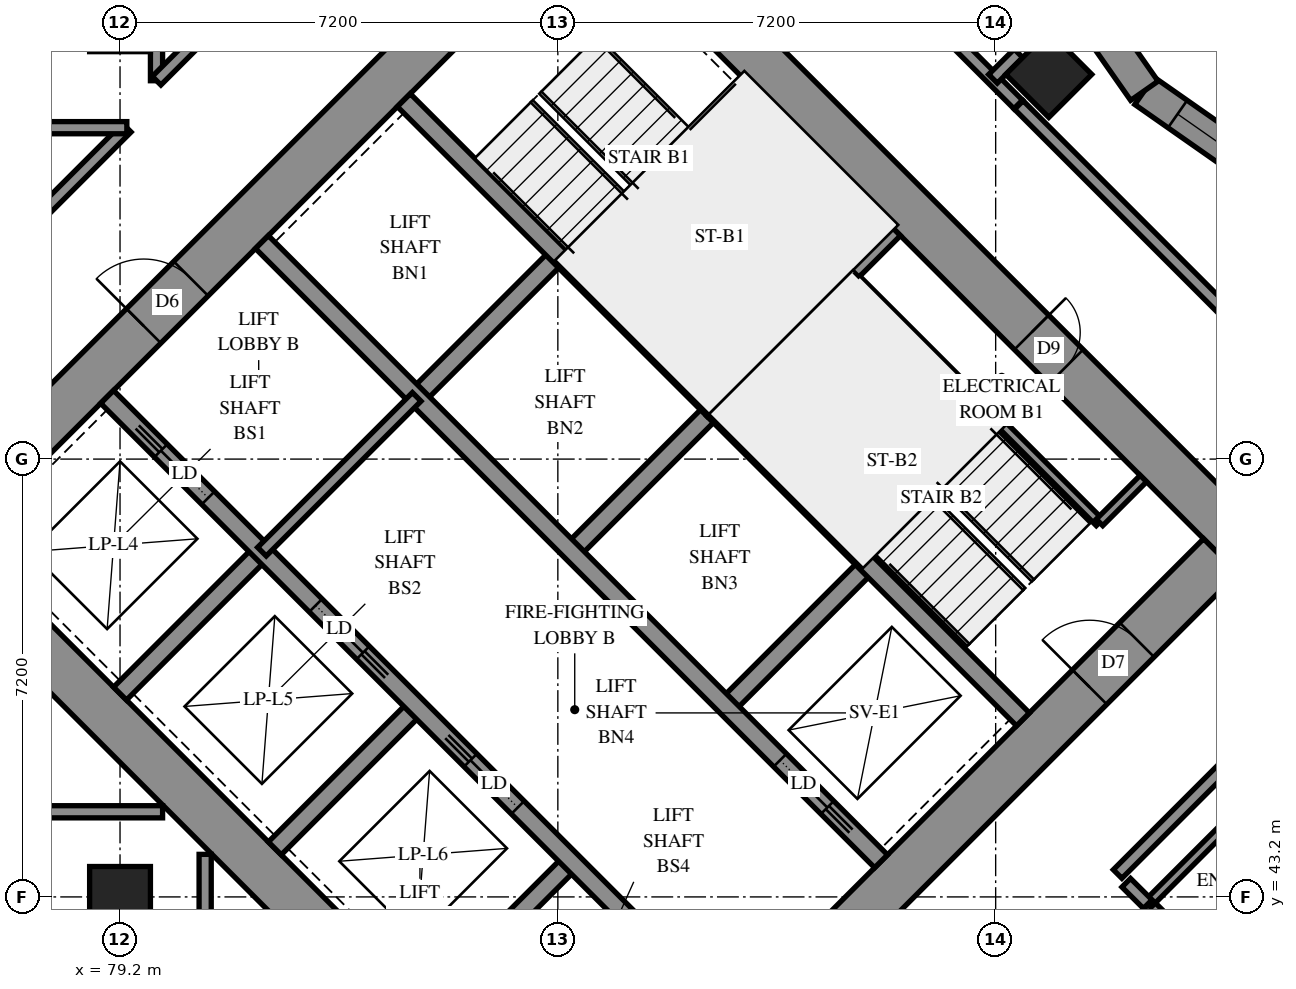
"""IFC4 building model, lengths in metres.
Left out: names, types, materials, properties, quantities, classifications, styles, units other than length and angle.
Written with IfcOpenShell. Run it as: python <this file> out.ifc"""

import sys

from ifc_helpers import new_model, si_unit, direction, frame, frame_2d, origin, origin_2d, place, context, subcontext, project, spatial, polyline, rectangle, outline, extrude, element, fill, save


model = new_model("IFC4")
c1 = context("Model", 3, precision=1e-05, world=origin(), true_north=direction((0.0, 1.0)))
c2 = subcontext(c1, "Body", "Model", "MODEL_VIEW")
j1 = project(units=[si_unit("LENGTHUNIT", "METRE"), si_unit("PLANEANGLEUNIT", "RADIAN")], contexts=[c1])
p1 = place(None, origin())
s1 = spatial("IfcSite", under=j1, at=p1, CompositionType="ELEMENT")
p2 = place(p1, origin())
s2 = spatial("IfcBuilding", under=s1, at=p2, CompositionType="ELEMENT")
p3 = place(p2, frame((0.0, 0.0, 115.2)))
s3 = spatial("IfcBuildingStorey", under=s2, at=p3, CompositionType="ELEMENT", Elevation=115.2)
for number, where, z_axis, x_axis in (
    (1, (79.2, 43.2, 0.0), (0.0, 0.0, 1.0), (1.0, 0.0, 0.0)),
    (2, (94.474, 56.727, 0.0), (0.0, 0.0, 1.0), (0.707, -0.707, 0.0)),
):
    element("IfcColumn", number, at=place(p3, frame(where, z_axis=z_axis, x_axis=x_axis)), inside=s3, PredefinedType="COLUMN", context=c2, shape_type="SweptSolid", body=[
        extrude(rectangle(XDim=1.0, YDim=1.0, at=origin_2d()), origin(), (0.0, 0.0, 1.0), 3.1),
    ])
p4 = place(p3, frame((75.806, 49.373, -0.3), z_axis=(0.0, 0.0, 1.0), x_axis=(0.7071067812, -0.7071067812, 0.0)))
e3 = element("IfcWall", 3, at=p4, inside=s3, PredefinedType="SHEAR", context=c2, shape_type="SweptSolid", body=[
    extrude(rectangle(XDim=16.0, YDim=0.8, at=frame_2d((8.0, 0.0))), origin(), (0.0, 0.0, 1.0), 2.7),
])
p5 = place(p3, frame((86.554, 60.121, -0.3), z_axis=(0.0, 0.0, 1.0), x_axis=(0.7071067812, -0.7071067812, 0.0)))
e4 = element("IfcWall", 4, at=p5, inside=s3, PredefinedType="SHEAR", context=c2, shape_type="SweptSolid", body=[
    extrude(rectangle(XDim=16.0, YDim=0.8, at=frame_2d((8.0, 0.0))), origin(), (0.0, 0.0, 1.0), 2.7),
])
p6 = place(p5, frame((10.8, 0.0, 0.3)))
e5 = element("IfcOpeningElement", 5, at=p6, cuts=e4, PredefinedType="OPENING", context=c2, shape_type="SweptSolid", body=[
    extrude(rectangle(XDim=0.8, YDim=2.1, at=frame_2d((0.4, 1.05))), frame((0.0, 0.41, 0.0), z_axis=(0.0, -1.0, 0.0), x_axis=(1.0, 0.0, 0.0)), (0.0, 0.0, 1.0), 0.82),
])
p7 = place(p3, frame((76.372, 49.373, -0.3), z_axis=(0.0, 0.0, 1.0), x_axis=(0.7071067812, 0.7071067812, 0.0)))
e6 = element("IfcWall", 6, at=p7, inside=s3, PredefinedType="SHEAR", context=c2, shape_type="SweptSolid", body=[
    extrude(rectangle(XDim=14.4, YDim=0.8, at=frame_2d((7.2, 0.0))), origin(), (0.0, 0.0, 1.0), 2.7),
])
p8 = place(p7, frame((4.55, 0.0, 0.3)))
e7 = element("IfcOpeningElement", 7, at=p8, cuts=e6, PredefinedType="OPENING", context=c2, shape_type="SweptSolid", body=[
    extrude(rectangle(XDim=1.1, YDim=2.1, at=frame_2d((0.55, 1.05))), frame((0.0, 0.41, 0.0), z_axis=(0.0, -1.0, 0.0), x_axis=(1.0, 0.0, 0.0)), (0.0, 0.0, 1.0), 0.82),
])
p9 = place(p7, frame((11.35, 0.0, 0.3)))
e8 = element("IfcOpeningElement", 8, at=p9, cuts=e6, PredefinedType="OPENING", context=c2, shape_type="SweptSolid", body=[
    extrude(rectangle(XDim=1.1, YDim=2.1, at=frame_2d((0.55, 1.05))), frame((0.0, 0.41, 0.0), z_axis=(0.0, -1.0, 0.0), x_axis=(1.0, 0.0, 0.0)), (0.0, 0.0, 1.0), 0.82),
])
p10 = place(p3, frame((87.12, 38.625, -0.3), z_axis=(0.0, 0.0, 1.0), x_axis=(0.7071067812, 0.7071067812, 0.0)))
e9 = element("IfcWall", 9, at=p10, inside=s3, PredefinedType="SHEAR", context=c2, shape_type="SweptSolid", body=[
    extrude(rectangle(XDim=14.4, YDim=0.8, at=frame_2d((7.2, 0.0))), origin(), (0.0, 0.0, 1.0), 2.7),
])
p11 = place(p10, frame((4.55, 0.0, 0.3)))
e10 = element("IfcOpeningElement", 10, at=p11, cuts=e9, PredefinedType="OPENING", context=c2, shape_type="SweptSolid", body=[
    extrude(rectangle(XDim=1.1, YDim=2.1, at=frame_2d((0.55, 1.05))), frame((0.0, 0.41, 0.0), z_axis=(0.0, -1.0, 0.0), x_axis=(1.0, 0.0, 0.0)), (0.0, 0.0, 1.0), 0.82),
])
p12 = place(p10, frame((11.35, 0.0, 0.3)))
e11 = element("IfcOpeningElement", 11, at=p12, cuts=e9, PredefinedType="OPENING", context=c2, shape_type="SweptSolid", body=[
    extrude(rectangle(XDim=1.1, YDim=2.1, at=frame_2d((0.55, 1.05))), frame((0.0, 0.41, 0.0), z_axis=(0.0, -1.0, 0.0), x_axis=(1.0, 0.0, 0.0)), (0.0, 0.0, 1.0), 0.82),
])
for number, where, z_axis, x_axis in (
    (12, (79.2, 46.544, 0.0), (0.0, 0.0, 1.0), (0.707, 0.707, 0.0)),
    (13, (84.079, 51.423, 0.0), (0.0, 0.0, 1.0), (0.707, 0.707, 0.0)),
):
    element("IfcWall", number, at=place(p3, frame(where, z_axis=z_axis, x_axis=x_axis)), inside=s3, PredefinedType="SOLIDWALL", context=c2, shape_type="SweptSolid", body=[
        extrude(rectangle(XDim=3.3, YDim=0.3, at=frame_2d((1.65, 0.0))), origin(), (0.0, 0.0, 1.0), 3.1),
    ])
p13 = place(p3, frame((81.746, 43.999, 0.0), z_axis=(0.0, 0.0, 1.0), x_axis=(0.7071067812, 0.7071067812, 0.0)))
e14 = element("IfcWall", 14, at=p13, inside=s3, PredefinedType="SOLIDWALL", context=c2, shape_type="SweptSolid", body=[
    extrude(rectangle(XDim=3.3, YDim=0.3, at=frame_2d((1.65, 0.0))), origin(), (0.0, 0.0, 1.0), 3.1),
])
p14 = place(p3, frame((86.625, 48.878, 0.0), z_axis=(0.0, 0.0, 1.0), x_axis=(0.7071067812, 0.7071067812, 0.0)))
e15 = element("IfcWall", 15, at=p14, inside=s3, PredefinedType="SOLIDWALL", context=c2, shape_type="SweptSolid", body=[
    extrude(rectangle(XDim=3.3, YDim=0.3, at=frame_2d((1.65, 0.0))), origin(), (0.0, 0.0, 1.0), 3.1),
])
p15 = place(p3, frame((84.291, 41.453, 0.0), z_axis=(0.0, 0.0, 1.0), x_axis=(0.7071067812, 0.7071067812, 0.0)))
e16 = element("IfcWall", 16, at=p15, inside=s3, PredefinedType="SOLIDWALL", context=c2, shape_type="SweptSolid", body=[
    extrude(rectangle(XDim=3.3, YDim=0.3, at=frame_2d((1.65, 0.0))), origin(), (0.0, 0.0, 1.0), 3.1),
])
p16 = place(p3, frame((89.17, 46.332, 0.0), z_axis=(0.0, 0.0, 1.0), x_axis=(0.7071067812, 0.7071067812, 0.0)))
e17 = element("IfcWall", 17, at=p16, inside=s3, PredefinedType="SOLIDWALL", context=c2, shape_type="SweptSolid", body=[
    extrude(rectangle(XDim=3.3, YDim=0.3, at=frame_2d((1.65, 0.0))), origin(), (0.0, 0.0, 1.0), 3.1),
])
p17 = place(p3, frame((78.988, 51.423, 0.0), z_axis=(0.0, 0.0, 1.0), x_axis=(0.7071067812, -0.7071067812, 0.0)))
e18 = element("IfcWall", 18, at=p17, inside=s3, PredefinedType="SOLIDWALL", context=c2, shape_type="SweptSolid", body=[
    extrude(rectangle(XDim=14.4, YDim=0.3, at=frame_2d((7.2, 0.0))), origin(), (0.0, 0.0, 1.0), 3.1),
])
p18 = place(p17, frame((1.25, 0.0, 0.0)))
e19 = element("IfcOpeningElement", 19, at=p18, cuts=e18, PredefinedType="OPENING", context=c2, shape_type="SweptSolid", body=[
    extrude(rectangle(XDim=1.1, YDim=2.1, at=frame_2d((0.55, 1.05))), frame((0.0, 0.16, 0.0), z_axis=(0.0, -1.0, 0.0), x_axis=(1.0, 0.0, 0.0)), (0.0, 0.0, 1.0), 0.32),
])
p19 = place(p17, frame((4.85, 0.0, 0.0)))
e20 = element("IfcOpeningElement", 20, at=p19, cuts=e18, PredefinedType="OPENING", context=c2, shape_type="SweptSolid", body=[
    extrude(rectangle(XDim=1.1, YDim=2.1, at=frame_2d((0.55, 1.05))), frame((0.0, 0.16, 0.0), z_axis=(0.0, -1.0, 0.0), x_axis=(1.0, 0.0, 0.0)), (0.0, 0.0, 1.0), 0.32),
])
p20 = place(p17, frame((8.45, 0.0, 0.0)))
e21 = element("IfcOpeningElement", 21, at=p20, cuts=e18, PredefinedType="OPENING", context=c2, shape_type="SweptSolid", body=[
    extrude(rectangle(XDim=1.1, YDim=2.1, at=frame_2d((0.55, 1.05))), frame((0.0, 0.16, 0.0), z_axis=(0.0, -1.0, 0.0), x_axis=(1.0, 0.0, 0.0)), (0.0, 0.0, 1.0), 0.32),
])
p21 = place(p17, frame((12.05, 0.0, 0.0)))
e22 = element("IfcOpeningElement", 22, at=p21, cuts=e18, PredefinedType="OPENING", context=c2, shape_type="SweptSolid", body=[
    extrude(rectangle(XDim=1.1, YDim=2.1, at=frame_2d((0.55, 1.05))), frame((0.0, 0.16, 0.0), z_axis=(0.0, -1.0, 0.0), x_axis=(1.0, 0.0, 0.0)), (0.0, 0.0, 1.0), 0.32),
])
p22 = place(p3, frame((81.534, 53.969, 0.0), z_axis=(0.0, 0.0, 1.0), x_axis=(0.707103309, -0.7071102534, 0.0)))
e23 = element("IfcWall", 23, at=p22, inside=s3, PredefinedType="SOLIDWALL", context=c2, shape_type="SweptSolid", body=[
    extrude(rectangle(XDim=14.4, YDim=0.3, at=frame_2d((7.2, 0.0))), origin(), (0.0, 0.0, 1.0), 3.1),
])
p23 = place(p22, frame((12.05, 0.0, 0.0)))
e24 = element("IfcOpeningElement", 24, at=p23, cuts=e23, PredefinedType="OPENING", context=c2, shape_type="SweptSolid", body=[
    extrude(rectangle(XDim=1.1, YDim=2.1, at=frame_2d((0.55, 1.05))), frame((0.0, 0.16, 0.0), z_axis=(0.0, -1.0, 0.0), x_axis=(1.0, 0.0, 0.0)), (0.0, 0.0, 1.0), 0.32),
])
for number, where, z_axis, x_axis in (
    (25, (83.867, 56.302, 0.0), (0.0, 0.0, 1.0), (0.707, -0.707, 0.0)),
    (26, (88.958, 51.211, 0.0), (0.0, 0.0, 1.0), (0.707, -0.707, 0.0)),
):
    element("IfcWall", number, at=place(p3, frame(where, z_axis=z_axis, x_axis=x_axis)), inside=s3, PredefinedType="SOLIDWALL", context=c2, shape_type="SweptSolid", body=[
        extrude(rectangle(XDim=7.2, YDim=0.3, at=frame_2d((3.6, 0.0))), origin(), (0.0, 0.0, 1.0), 3.1),
    ])
p24 = place(p3, frame((88.958, 51.211, 0.0), z_axis=(0.0, 0.0, 1.0), x_axis=(0.7071067812, 0.7071067812, 0.0)))
e27 = element("IfcWall", 27, at=p24, inside=s3, PredefinedType="SOLIDWALL", context=c2, shape_type="SweptSolid", body=[
    extrude(rectangle(XDim=4.2, YDim=0.3, at=frame_2d((2.1, 0.0))), origin(), (0.0, 0.0, 1.0), 3.1),
])
p25 = place(p3, frame((98.886, 54.469, 0.0), z_axis=(0.0, 0.0, 1.0), x_axis=(-0.8193105103, 0.5733500568, 0.0)))
e28 = element("IfcWall", 28, at=p25, inside=s3, PredefinedType="SOLIDWALL", context=c2, shape_type="SweptSolid", body=[
    extrude(outline(polyline([(-0.049, -0.275), (3.418, -0.275), (3.515, 0.275), (0.049, 0.275), (-0.049, -0.275)])), origin(), (0.0, 0.0, 1.0), 3.1),
])
p26 = place(p25, frame((1.6, 0.0, 0.5)))
e29 = element("IfcOpeningElement", 29, at=p26, cuts=e28, PredefinedType="OPENING", context=c2, shape_type="SweptSolid", body=[
    extrude(rectangle(XDim=1.2, YDim=2.45, at=frame_2d((0.6, 1.225))), frame((0.0, 0.285, 0.0), z_axis=(0.0, -1.0, 0.0), x_axis=(1.0, 0.0, 0.0)), (0.0, 0.0, 1.0), 0.57),
])
p27 = place(p3, frame((96.046, 56.457, 0.0), z_axis=(0.0, 0.0, 1.0), x_axis=(-0.5733500568, 0.8193105103, 0.0)))
e30 = element("IfcWall", 30, at=p27, inside=s3, PredefinedType="SOLIDWALL", context=c2, shape_type="SweptSolid", body=[
    extrude(outline(polyline([(0.049, -0.275), (3.515, -0.275), (3.418, 0.275), (-0.049, 0.275), (0.049, -0.275)])), origin(), (0.0, 0.0, 1.0), 3.1),
])
p28 = place(p27, frame((1.92, 0.0, 0.5)))
e31 = element("IfcOpeningElement", 31, at=p28, cuts=e30, PredefinedType="OPENING", context=c2, shape_type="SweptSolid", body=[
    extrude(rectangle(XDim=1.2, YDim=2.45, at=frame_2d((0.6, 1.225))), frame((0.0, 0.285, 0.0), z_axis=(0.0, -1.0, 0.0), x_axis=(1.0, 0.0, 0.0)), (0.0, 0.0, 1.0), 0.57),
])
p29 = place(p3, frame((91.313, 53.354, 0.0), z_axis=(0.0, 0.0, 1.0), x_axis=(0.7071067812, -0.7071067812, 0.0)))
e32 = element("IfcWall", 32, at=p29, inside=s3, PredefinedType="PARTITIONING", context=c2, shape_type="SweptSolid", body=[
    extrude(rectangle(XDim=5.65, YDim=0.15, at=frame_2d((2.825, 0.0))), origin(), (0.0, 0.0, 1.0), 3.1),
])
p30 = place(p3, frame((95.308, 49.358, 0.0), z_axis=(0.0, 0.0, 1.0), x_axis=(0.70705776, 0.707155799, 0.0)))
e33 = element("IfcWall", 33, at=p30, inside=s3, PredefinedType="PARTITIONING", context=c2, shape_type="SweptSolid", body=[
    extrude(rectangle(XDim=1.02, YDim=0.15, at=frame_2d((0.51, 0.0))), origin(), (0.0, 0.0, 1.0), 3.1),
])
p31 = place(p3, frame((81.534, 48.878, 0.0), z_axis=(0.0, 0.0, 1.0), x_axis=(0.707092892, 0.7071206701, 0.0)))
e34 = element("IfcWall", 34, at=p31, inside=s3, PredefinedType="PARTITIONING", context=c2, shape_type="SweptSolid", body=[
    extrude(rectangle(XDim=3.6, YDim=0.2, at=frame_2d((1.8, 0.0))), origin(), (0.0, 0.0, 1.0), 3.1),
])
p32 = place(p3, frame((96.103, 43.083, 0.0), z_axis=(0.0, 0.0, 1.0), x_axis=(0.7071067812, -0.7071067812, 0.0)))
e35 = element("IfcWall", 35, at=p32, inside=s3, PredefinedType="PARTITIONING", context=c2, shape_type="SweptSolid", body=[
    extrude(rectangle(XDim=8.491, YDim=0.2, at=frame_2d((4.245, 0.0))), origin(), (0.0, 0.0, 1.0), 3.1),
])
p33 = place(p32, frame((1.995, 0.0, 0.0)))
e36 = element("IfcOpeningElement", 36, at=p33, cuts=e35, PredefinedType="OPENING", context=c2, shape_type="SweptSolid", body=[
    extrude(rectangle(XDim=0.9, YDim=2.1, at=frame_2d((0.45, 1.05))), frame((0.0, 0.11, 0.0), z_axis=(0.0, -1.0, 0.0), x_axis=(1.0, 0.0, 0.0)), (0.0, 0.0, 1.0), 0.22),
])
p34 = place(p32, frame((4.27, 0.0, 0.0)))
e37 = element("IfcOpeningElement", 37, at=p34, cuts=e35, PredefinedType="OPENING", context=c2, shape_type="SweptSolid", body=[
    extrude(rectangle(XDim=0.9, YDim=2.1, at=frame_2d((0.45, 1.05))), frame((0.0, 0.11, 0.0), z_axis=(0.0, -1.0, 0.0), x_axis=(1.0, 0.0, 0.0)), (0.0, 0.0, 1.0), 0.22),
])
p35 = place(p3, frame((95.606, 43.577, 0.0), z_axis=(0.0, 0.0, 1.0), x_axis=(0.7071067812, 0.7071067812, 0.0)))
e38 = element("IfcWall", 38, at=p35, inside=s3, PredefinedType="PARTITIONING", context=c2, shape_type="SweptSolid", body=[
    extrude(rectangle(XDim=7.798, YDim=0.2, at=frame_2d((3.899, 0.0))), origin(), (0.0, 0.0, 1.0), 3.1),
])
p36 = place(p3, frame((88.889, 61.315, 0.0), z_axis=(0.0, 0.0, 1.0), x_axis=(0.7071067812, -0.7071067812, 0.0)))
e39 = element("IfcWall", 39, at=p36, inside=s3, PredefinedType="PARTITIONING", context=c2, shape_type="SweptSolid", body=[
    extrude(rectangle(XDim=7.187, YDim=0.2, at=frame_2d((3.594, 0.0))), origin(), (0.0, 0.0, 1.0), 3.1),
])
p37 = place(p3, frame((93.981, 56.223, 0.0), z_axis=(0.0, 0.0, 1.0), x_axis=(0.7071067812, -0.7071067812, 0.0)))
e40 = element("IfcWall", 40, at=p37, inside=s3, PredefinedType="PARTITIONING", context=c2, shape_type="SweptSolid", body=[
    extrude(rectangle(XDim=7.184, YDim=0.2, at=frame_2d((3.592, 0.0))), origin(), (0.0, 0.0, 1.0), 3.1),
])
p38 = place(p3, frame((79.8, 56.622, 0.0), z_axis=(0.0, 0.0, 1.0), x_axis=(0.0, 1.0, 0.0)))
e41 = element("IfcWall", 41, at=p38, inside=s3, PredefinedType="PARTITIONING", context=c2, shape_type="SweptSolid", body=[
    extrude(rectangle(XDim=2.758, YDim=0.2, at=frame_2d((1.379, 0.0))), origin(), (0.0, 0.0, 1.0), 3.1),
])
p39 = place(p3, frame((77.363, 53.901, 0.0), z_axis=(0.0, 0.0, 1.0), x_axis=(0.7071067812, 0.7071067812, 0.0)))
e42 = element("IfcWall", 42, at=p39, inside=s3, PredefinedType="PARTITIONING", context=c2, shape_type="SweptSolid", body=[
    extrude(rectangle(XDim=2.755, YDim=0.2, at=frame_2d((1.377, 0.0))), origin(), (0.0, 0.0, 1.0), 3.1),
])
p40 = place(p3, frame((96.099, 43.081, 0.0), z_axis=(0.0, 0.0, 1.0), x_axis=(0.7071067812, 0.7071067812, 0.0)))
e43 = element("IfcWall", 43, at=p40, inside=s3, PredefinedType="PARTITIONING", context=c2, shape_type="SweptSolid", body=[
    extrude(rectangle(XDim=2.398, YDim=0.15, at=frame_2d((1.199, 0.0))), origin(), (0.0, 0.0, 1.0), 3.1),
])
for number, where, z_axis, x_axis in (
    (44, (77.802, 44.6, 0.0), (0.0, 0.0, 1.0), (1.0, 0.0, 0.0)),
    (45, (80.6, 41.802, 0.0), (0.0, 0.0, 1.0), (0.0, 1.0, 0.0)),
):
    element("IfcWall", number, at=place(p3, frame(where, z_axis=z_axis, x_axis=x_axis)), inside=s3, PredefinedType="PARTITIONING", context=c2, shape_type="SweptSolid", body=[
        extrude(rectangle(XDim=2.098, YDim=0.2, at=frame_2d((1.049, 0.0))), origin(), (0.0, 0.0, 1.0), 3.1),
    ])
p41 = place(p3, frame((79.802, 56.623, 0.0), z_axis=(0.0, 0.0, 1.0), x_axis=(0.7071067812, 0.7071067812, 0.0)))
e46 = element("IfcWall", 46, at=p41, inside=s3, PredefinedType="PARTITIONING", context=c2, shape_type="SweptSolid", body=[
    extrude(rectangle(XDim=1.949, YDim=0.2, at=frame_2d((0.974, 0.0))), origin(), (0.0, 0.0, 1.0), 3.1),
])
p42 = place(p3, frame((77.452, 55.85, 0.0), z_axis=(0.0, 0.0, 1.0), x_axis=(1.0, 0.0, 0.0)))
e47 = element("IfcWall", 47, at=p42, inside=s3, PredefinedType="PARTITIONING", context=c2, shape_type="SweptSolid", body=[
    extrude(rectangle(XDim=1.86, YDim=0.2, at=frame_2d((0.93, 0.0))), origin(), (0.0, 0.0, 1.0), 3.1),
])
p43 = place(p3, frame((93.556, 56.654, 0.0), z_axis=(0.0, 0.0, 1.0), x_axis=(0.7087923682, 0.7054171665, 0.0)))
e48 = element("IfcWall", 48, at=p43, inside=s3, PredefinedType="PARTITIONING", context=c2, shape_type="SweptSolid", body=[
    extrude(rectangle(XDim=0.593, YDim=0.2, at=frame_2d((0.296, 0.0))), origin(), (0.0, 0.0, 1.0), 3.1),
])
p44 = place(p3, frame((95.747, 43.433, 0.0), z_axis=(0.0, 0.0, 1.0), x_axis=(0.7091070712, -0.7051008166, 0.0)))
e49 = element("IfcWall", 49, at=p44, inside=s3, PredefinedType="PARTITIONING", context=c2, shape_type="SweptSolid", body=[
    extrude(rectangle(XDim=0.499, YDim=0.2, at=frame_2d((0.25, 0.0))), origin(), (0.0, 0.0, 1.0), 3.1),
])
p45 = place(p26, origin())
e50 = element("IfcWindow", 50, at=p45, inside=s3, PartitioningType="SINGLE_PANEL", PredefinedType="WINDOW", context=c2, shape_type="SweptSolid", body=[
    extrude(rectangle(XDim=1.2, YDim=2.45, at=frame_2d((0.6, 1.225))), frame((0.0, 0.155, 0.0), z_axis=(0.0, -1.0, 0.0), x_axis=(1.0, 0.0, 0.0)), (0.0, 0.0, 1.0), 0.06),
])
fill(e29, e50)
p46 = place(p6, origin())
e51 = element("IfcDoor", 51, at=p46, inside=s3, OperationType="SINGLE_SWING_RIGHT", PredefinedType="DOOR", context=c2, shape_type="SweptSolid", body=[
    extrude(rectangle(XDim=0.8, YDim=2.1, at=frame_2d((0.4, 1.05))), frame((0.0, -0.34, 0.0), z_axis=(0.0, -1.0, 0.0), x_axis=(1.0, 0.0, 0.0)), (0.0, 0.0, 1.0), 0.05),
])
fill(e5, e51)
p47 = place(p8, origin())
e52 = element("IfcDoor", 52, at=p47, inside=s3, OperationType="DOUBLE_DOOR_SINGLE_SWING", PredefinedType="DOOR", context=c2, shape_type="SweptSolid", body=[
    extrude(rectangle(XDim=1.1, YDim=2.1, at=frame_2d((0.55, 1.05))), frame((0.0, 0.025, 0.0), z_axis=(0.0, -1.0, 0.0), x_axis=(1.0, 0.0, 0.0)), (0.0, 0.0, 1.0), 0.05),
])
fill(e7, e52)
p48 = place(p12, origin())
e53 = element("IfcDoor", 53, at=p48, inside=s3, OperationType="SINGLE_SWING_RIGHT", PredefinedType="DOOR", context=c2, shape_type="SweptSolid", body=[
    extrude(rectangle(XDim=1.1, YDim=2.1, at=frame_2d((0.55, 1.05))), frame((0.0, 0.025, 0.0), z_axis=(0.0, -1.0, 0.0), x_axis=(1.0, 0.0, 0.0)), (0.0, 0.0, 1.0), 0.05),
])
fill(e11, e53)
p49 = place(p18, origin())
e54 = element("IfcDoor", 54, at=p49, inside=s3, OperationType="SLIDING_TO_LEFT", PredefinedType="DOOR", context=c2, shape_type="SweptSolid", body=[
    extrude(rectangle(XDim=1.1, YDim=2.1, at=frame_2d((0.55, 1.05))), frame((0.0, 0.025, 0.0), z_axis=(0.0, -1.0, 0.0), x_axis=(1.0, 0.0, 0.0)), (0.0, 0.0, 1.0), 0.05),
])
fill(e19, e54)
p50 = place(p19, origin())
e55 = element("IfcDoor", 55, at=p50, inside=s3, OperationType="SLIDING_TO_RIGHT", PredefinedType="DOOR", context=c2, shape_type="SweptSolid", body=[
    extrude(rectangle(XDim=1.1, YDim=2.1, at=frame_2d((0.55, 1.05))), frame((0.0, 0.025, 0.0), z_axis=(0.0, -1.0, 0.0), x_axis=(1.0, 0.0, 0.0)), (0.0, 0.0, 1.0), 0.05),
])
fill(e20, e55)
p51 = place(p20, origin())
e56 = element("IfcDoor", 56, at=p51, inside=s3, OperationType="SLIDING_TO_LEFT", PredefinedType="DOOR", context=c2, shape_type="SweptSolid", body=[
    extrude(rectangle(XDim=1.1, YDim=2.1, at=frame_2d((0.55, 1.05))), frame((0.0, 0.025, 0.0), z_axis=(0.0, -1.0, 0.0), x_axis=(1.0, 0.0, 0.0)), (0.0, 0.0, 1.0), 0.05),
])
fill(e21, e56)
p52 = place(p23, origin())
e57 = element("IfcDoor", 57, at=p52, inside=s3, OperationType="SLIDING_TO_RIGHT", PredefinedType="DOOR", context=c2, shape_type="SweptSolid", body=[
    extrude(rectangle(XDim=1.1, YDim=2.1, at=frame_2d((0.55, 1.05))), frame((0.0, 0.025, 0.0), z_axis=(0.0, -1.0, 0.0), x_axis=(1.0, 0.0, 0.0)), (0.0, 0.0, 1.0), 0.05),
])
fill(e24, e57)
save(model, sys.argv[1])
